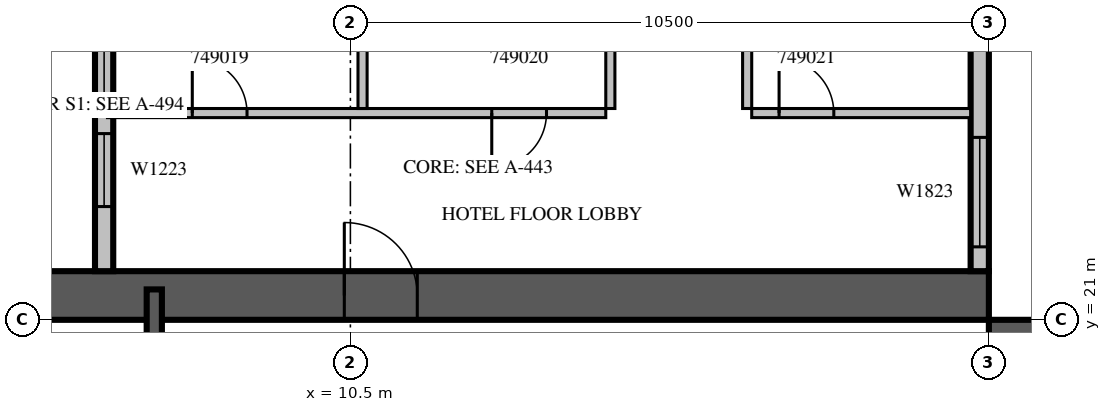
"""IFC4 building model, lengths in metres.
Left out: names, types, materials, properties, quantities, classifications, styles, units other than length and angle.
Written with IfcOpenShell. Run it as: python <this file> out.ifc"""

import sys

from ifc_helpers import new_model, si_unit, direction, frame, frame_2d, origin, place, context, subcontext, project, spatial, rectangle, extrude, source, transform, mapped, element, fill, save


model = new_model("IFC4")
c1 = context("Model", 3, precision=1e-05, world=origin(), true_north=direction((0.0, 1.0)))
c2 = subcontext(c1, "Body", "Model", "MODEL_VIEW")
j1 = project(units=[si_unit("LENGTHUNIT", "METRE"), si_unit("PLANEANGLEUNIT", "RADIAN")], contexts=[c1])
p1 = place(None, origin())
s1 = spatial("IfcSite", under=j1, at=p1, CompositionType="ELEMENT")
p2 = place(p1, origin())
s2 = spatial("IfcBuilding", under=s1, at=p2, CompositionType="ELEMENT")
p3 = place(p2, frame((0.0, 0.0, 219.6)))
s3 = spatial("IfcBuildingStorey", under=s2, at=p3, CompositionType="ELEMENT", Elevation=219.6)
m1 = source(origin(), c2, "Body", "SweptSolid", [
    extrude(rectangle(XDim=16.8, YDim=0.8, at=frame_2d((8.4, 0.0))), origin(), (0.0, 0.0, 1.0), 3.8),
])
p4 = place(p3, frame((21.4, 4.2, 0.0), z_axis=(0.0, 0.0, 1.0), x_axis=(0.0, 1.0, 0.0)))
e1 = element("IfcWall", 1, at=p4, inside=s3, PredefinedType="SHEAR", context=c2, shape_type="MappedRepresentation", body=[
    mapped(m1, transform((0.0, 0.0, 0.0), scale=1.0)),
])
m2 = source(origin(), c2, "Body", "SweptSolid", [
    extrude(rectangle(XDim=2.2, YDim=2.1, at=frame_2d((1.1, 1.05))), frame((0.0, 0.41, 0.0), z_axis=(0.0, -1.0, 0.0), x_axis=(1.0, 0.0, 0.0)), (0.0, 0.0, 1.0), 0.82),
])
p5 = place(p4, frame((4.2, 0.0, 0.0)))
e2 = element("IfcOpeningElement", 2, at=p5, cuts=e1, PredefinedType="OPENING", context=c2, shape_type="MappedRepresentation", body=[
    mapped(m2, transform((0.0, 0.0, 0.0), scale=1.0)),
])
m3 = source(origin(), c2, "Body", "SweptSolid", [
    extrude(rectangle(XDim=1.2, YDim=2.1, at=frame_2d((0.6, 1.05))), frame((0.0, 0.41, 0.0), z_axis=(0.0, -1.0, 0.0), x_axis=(1.0, 0.0, 0.0)), (0.0, 0.0, 1.0), 0.82),
])
p6 = place(p4, frame((14.7, 0.0, 0.0)))
e3 = element("IfcOpeningElement", 3, at=p6, cuts=e1, PredefinedType="OPENING", context=c2, shape_type="MappedRepresentation", body=[
    mapped(m3, transform((0.0, 0.0, 0.0), scale=1.0)),
])
p7 = place(p3, frame((4.2, 21.4, 0.0), z_axis=(0.0, 0.0, 1.0), x_axis=(1.0, 0.0, 0.0)))
e4 = element("IfcWall", 4, at=p7, inside=s3, PredefinedType="SHEAR", context=c2, shape_type="MappedRepresentation", body=[
    mapped(m1, transform((0.0, 0.0, 0.0), scale=1.0)),
])
p8 = place(p7, frame((6.2, 0.0, 0.0)))
e5 = element("IfcOpeningElement", 5, at=p8, cuts=e4, PredefinedType="OPENING", context=c2, shape_type="MappedRepresentation", body=[
    mapped(m3, transform((0.0, 0.0, 0.0), scale=1.0)),
])
m4 = source(origin(), c2, "Body", "SweptSolid", [
    extrude(rectangle(XDim=7.15, YDim=0.3, at=frame_2d((3.575, 0.0))), origin(), (0.0, 0.0, 1.0), 3.4),
])
p9 = place(p3, frame((20.85, 21.8, 0.0), z_axis=(0.0, 0.0, 1.0), x_axis=(0.0, 1.0, 0.0)))
e6 = element("IfcWall", 6, at=p9, inside=s3, PredefinedType="STANDARD", context=c2, shape_type="MappedRepresentation", body=[
    mapped(m4, transform((0.0, 0.0, 0.0), scale=1.0)),
])
m5 = source(origin(), c2, "Body", "SweptSolid", [
    extrude(rectangle(XDim=1.8, YDim=2.3, at=frame_2d((0.9, 1.15))), frame((0.0, 0.16, 0.0), z_axis=(0.0, -1.0, 0.0), x_axis=(1.0, 0.0, 0.0)), (0.0, 0.0, 1.0), 0.32),
])
p10 = place(p9, frame((0.4, 0.0, 0.6)))
e7 = element("IfcOpeningElement", 7, at=p10, cuts=e6, PredefinedType="OPENING", context=c2, shape_type="MappedRepresentation", body=[
    mapped(m5, transform((0.0, 0.0, 0.0), scale=1.0)),
])
m6 = source(origin(), c2, "Body", "SweptSolid", [
    extrude(rectangle(XDim=3.0, YDim=2.3, at=frame_2d((1.5, 1.15))), frame((0.0, 0.16, 0.0), z_axis=(0.0, -1.0, 0.0), x_axis=(1.0, 0.0, 0.0)), (0.0, 0.0, 1.0), 0.32),
])
p11 = place(p9, frame((4.0, 0.0, 0.6)))
e8 = element("IfcOpeningElement", 8, at=p11, cuts=e6, PredefinedType="OPENING", context=c2, shape_type="MappedRepresentation", body=[
    mapped(m6, transform((0.0, 0.0, 0.0), scale=1.0)),
])
m7 = source(origin(), c2, "Body", "SweptSolid", [
    extrude(rectangle(XDim=16.6, YDim=0.3, at=frame_2d((8.3, 0.0))), origin(), (0.0, 0.0, 1.0), 3.4),
])
p12 = place(p3, frame((6.45, 38.4, 0.0), z_axis=(0.0, 0.0, 1.0), x_axis=(0.0, -1.0, 0.0)))
e9 = element("IfcWall", 9, at=p12, inside=s3, PredefinedType="STANDARD", context=c2, shape_type="MappedRepresentation", body=[
    mapped(m7, transform((0.0, 0.0, 0.0), scale=1.0)),
])
p13 = place(p12, frame((1.15, 0.0, 0.6)))
e10 = element("IfcOpeningElement", 10, at=p13, cuts=e9, PredefinedType="OPENING", context=c2, shape_type="MappedRepresentation", body=[
    mapped(m5, transform((0.0, 0.0, 0.0), scale=1.0)),
])
p14 = place(p12, frame((9.438, 0.0, 0.6)))
e11 = element("IfcOpeningElement", 11, at=p14, cuts=e9, PredefinedType="OPENING", context=c2, shape_type="MappedRepresentation", body=[
    mapped(m5, transform((0.0, 0.0, 0.0), scale=1.0)),
])
m8 = source(origin(), c2, "Body", "SweptSolid", [
    extrude(rectangle(XDim=1.2, YDim=2.3, at=frame_2d((0.6, 1.15))), frame((0.0, 0.16, 0.0), z_axis=(0.0, -1.0, 0.0), x_axis=(1.0, 0.0, 0.0)), (0.0, 0.0, 1.0), 0.32),
])
p15 = place(p12, frame((14.338, 0.0, 0.6)))
e12 = element("IfcOpeningElement", 12, at=p15, cuts=e9, PredefinedType="OPENING", context=c2, shape_type="MappedRepresentation", body=[
    mapped(m8, transform((0.0, 0.0, 0.0), scale=1.0)),
])
p16 = place(p12, frame((11.887, 0.0, 0.6)))
e13 = element("IfcOpeningElement", 13, at=p16, cuts=e9, PredefinedType="OPENING", context=c2, shape_type="MappedRepresentation", body=[
    mapped(m5, transform((0.0, 0.0, 0.0), scale=1.0)),
])
m9 = source(origin(), c2, "Body", "SweptSolid", [
    extrude(rectangle(XDim=1.0, YDim=2.1, at=frame_2d((0.5, 1.05))), frame((0.0, 0.16, 0.0), z_axis=(0.0, -1.0, 0.0), x_axis=(1.0, 0.0, 0.0)), (0.0, 0.0, 1.0), 0.32),
])
p17 = place(p12, frame((5.908, 0.0, 0.0)))
e14 = element("IfcOpeningElement", 14, at=p17, cuts=e9, PredefinedType="OPENING", context=c2, shape_type="MappedRepresentation", body=[
    mapped(m9, transform((0.0, 0.0, 0.0), scale=1.0)),
])
m10 = source(origin(), c2, "Body", "SweptSolid", [
    extrude(rectangle(XDim=6.6, YDim=0.25, at=frame_2d((3.3, 0.0))), origin(), (0.0, 0.0, 1.0), 3.4),
])
p18 = place(p3, frame((7.275, 14.9, 0.0), z_axis=(0.0, 0.0, 1.0), x_axis=(0.0, 1.0, 0.0)))
e15 = element("IfcWall", 15, at=p18, inside=s3, PredefinedType="SOLIDWALL", context=c2, shape_type="MappedRepresentation", body=[
    mapped(m10, transform((0.0, 0.0, 0.0), scale=1.0)),
])
m11 = source(origin(), c2, "Body", "SweptSolid", [
    extrude(rectangle(XDim=1.1, YDim=2.1, at=frame_2d((0.55, 1.05))), frame((0.0, 0.135, 0.0), z_axis=(0.0, -1.0, 0.0), x_axis=(1.0, 0.0, 0.0)), (0.0, 0.0, 1.0), 0.27),
])
p19 = place(p18, frame((0.15, 0.0, 0.0)))
e16 = element("IfcOpeningElement", 16, at=p19, cuts=e15, PredefinedType="OPENING", context=c2, shape_type="MappedRepresentation", body=[
    mapped(m11, transform((0.0, 0.0, 0.0), scale=1.0)),
])
m12 = source(origin(), c2, "Body", "SweptSolid", [
    extrude(rectangle(XDim=8.195, YDim=0.15, at=frame_2d((4.098, 0.0))), origin(), (0.0, 0.0, 1.0), 3.4),
])
p20 = place(p3, frame((6.505, 24.4, 0.0), z_axis=(0.0, 0.0, 1.0), x_axis=(1.0, 0.0, 0.0)))
e17 = element("IfcWall", 17, at=p20, inside=s3, PredefinedType="PARTITIONING", context=c2, shape_type="MappedRepresentation", body=[
    mapped(m12, transform((0.0, 0.0, 0.0), scale=1.0)),
])
m13 = source(origin(), c2, "Body", "SweptSolid", [
    extrude(rectangle(XDim=0.9, YDim=2.1, at=frame_2d((0.45, 1.05))), frame((0.0, 0.085, 0.0), z_axis=(0.0, -1.0, 0.0), x_axis=(1.0, 0.0, 0.0)), (0.0, 0.0, 1.0), 0.17),
])
p21 = place(p20, frame((1.395, 0.0, 0.0)))
e18 = element("IfcOpeningElement", 18, at=p21, cuts=e17, PredefinedType="OPENING", context=c2, shape_type="MappedRepresentation", body=[
    mapped(m13, transform((0.0, 0.0, 0.0), scale=1.0)),
])
p22 = place(p20, frame((6.32, 0.0, 0.0)))
e19 = element("IfcOpeningElement", 19, at=p22, cuts=e17, PredefinedType="OPENING", context=c2, shape_type="MappedRepresentation", body=[
    mapped(m13, transform((0.0, 0.0, 0.0), scale=1.0)),
])
m14 = source(origin(), c2, "Body", "SweptSolid", [
    extrude(rectangle(XDim=3.6, YDim=0.15, at=frame_2d((1.8, 0.0))), origin(), (0.0, 0.0, 1.0), 3.4),
])
p23 = place(p3, frame((17.1, 24.4, 0.0), z_axis=(0.0, 0.0, 1.0), x_axis=(1.0, 0.0, 0.0)))
e20 = element("IfcWall", 20, at=p23, inside=s3, PredefinedType="PARTITIONING", context=c2, shape_type="MappedRepresentation", body=[
    mapped(m14, transform((0.0, 0.0, 0.0), scale=1.0)),
])
p24 = place(p23, frame((0.45, 0.0, 0.0)))
e21 = element("IfcOpeningElement", 21, at=p24, cuts=e20, PredefinedType="OPENING", context=c2, shape_type="MappedRepresentation", body=[
    mapped(m13, transform((0.0, 0.0, 0.0), scale=1.0)),
])
m15 = source(origin(), c2, "Body", "SweptSolid", [
    extrude(rectangle(XDim=4.476, YDim=0.15, at=frame_2d((2.238, 0.0))), origin(), (0.0, 0.0, 1.0), 3.4),
])
p25 = place(p3, frame((10.7, 24.475, 0.0), z_axis=(0.0, 0.0, 1.0), x_axis=(0.0, 1.0, 0.0)))
e22 = element("IfcWall", 22, at=p25, inside=s3, PredefinedType="PARTITIONING", context=c2, shape_type="MappedRepresentation", body=[
    mapped(m15, transform((0.0, 0.0, 0.0), scale=1.0)),
])
m16 = source(origin(), c2, "Body", "SweptSolid", [
    extrude(rectangle(XDim=4.85, YDim=0.15, at=frame_2d((2.425, 0.0))), origin(), (0.0, 0.0, 1.0), 3.4),
])
for number, where, z_axis, x_axis in (
    (23, (14.775, 24.475, 0.0), (0.0, 0.0, 1.0), (0.0, 1.0, 0.0)),
    (24, (17.025, 29.325, 0.0), (0.0, 0.0, 1.0), (0.0, -1.0, 0.0)),
):
    element("IfcWall", number, at=place(p3, frame(where, z_axis=z_axis, x_axis=x_axis)), inside=s3, PredefinedType="PARTITIONING", context=c2, shape_type="MappedRepresentation", body=[
        mapped(m16, transform((0.0, 0.0, 0.0), scale=1.0)),
    ])
m17 = source(origin(), c2, "Body", "SweptSolid", [
    extrude(rectangle(XDim=1.8, YDim=2.3, at=frame_2d((0.9, 1.15))), frame((0.0, 0.03, 0.0), z_axis=(0.0, -1.0, 0.0), x_axis=(1.0, 0.0, 0.0)), (0.0, 0.0, 1.0), 0.06),
])
p26 = place(p10, origin())
e25 = element("IfcWindow", 25, at=p26, inside=s3, PartitioningType="SINGLE_PANEL", PredefinedType="WINDOW", context=c2, shape_type="MappedRepresentation", body=[
    mapped(m17, transform((0.0, 0.0, 0.0), scale=1.0)),
])
fill(e7, e25)
m18 = source(origin(), c2, "Body", "SweptSolid", [
    extrude(rectangle(XDim=1.2, YDim=2.3, at=frame_2d((0.6, 1.15))), frame((0.0, 0.03, 0.0), z_axis=(0.0, -1.0, 0.0), x_axis=(1.0, 0.0, 0.0)), (0.0, 0.0, 1.0), 0.06),
])
p27 = place(p15, origin())
e26 = element("IfcWindow", 26, at=p27, inside=s3, PartitioningType="SINGLE_PANEL", PredefinedType="WINDOW", context=c2, shape_type="MappedRepresentation", body=[
    mapped(m18, transform((0.0, 0.0, 0.0), scale=1.0)),
])
fill(e12, e26)
p28 = place(p16, origin())
e27 = element("IfcWindow", 27, at=p28, inside=s3, PartitioningType="SINGLE_PANEL", PredefinedType="WINDOW", context=c2, shape_type="MappedRepresentation", body=[
    mapped(m17, transform((0.0, 0.0, 0.0), scale=1.0)),
])
fill(e13, e27)
m19 = source(origin(), c2, "Body", "SweptSolid", [
    extrude(rectangle(XDim=1.2, YDim=2.1, at=frame_2d((0.6, 1.05))), frame((0.0, 0.025, 0.0), z_axis=(0.0, -1.0, 0.0), x_axis=(1.0, 0.0, 0.0)), (0.0, 0.0, 1.0), 0.05),
])
p29 = place(p8, origin())
e28 = element("IfcDoor", 28, at=p29, inside=s3, OperationType="SINGLE_SWING_LEFT", PredefinedType="DOOR", context=c2, shape_type="MappedRepresentation", body=[
    mapped(m19, transform((0.0, 0.0, 0.0), scale=1.0)),
])
fill(e5, e28)
m20 = source(origin(), c2, "Body", "SweptSolid", [
    extrude(rectangle(XDim=0.9, YDim=2.1, at=frame_2d((0.45, 1.05))), frame((0.0, 0.025, 0.0), z_axis=(0.0, -1.0, 0.0), x_axis=(1.0, 0.0, 0.0)), (0.0, 0.0, 1.0), 0.05),
])
p30 = place(p21, origin())
e29 = element("IfcDoor", 29, at=p30, inside=s3, OperationType="SINGLE_SWING_LEFT", PredefinedType="DOOR", context=c2, shape_type="MappedRepresentation", body=[
    mapped(m20, transform((0.0, 0.0, 0.0), scale=1.0)),
])
fill(e18, e29)
p31 = place(p22, origin())
e30 = element("IfcDoor", 30, at=p31, inside=s3, OperationType="SINGLE_SWING_RIGHT", PredefinedType="DOOR", context=c2, shape_type="MappedRepresentation", body=[
    mapped(m20, transform((0.0, 0.0, 0.0), scale=1.0)),
])
fill(e19, e30)
p32 = place(p24, origin())
e31 = element("IfcDoor", 31, at=p32, inside=s3, OperationType="SINGLE_SWING_LEFT", PredefinedType="DOOR", context=c2, shape_type="MappedRepresentation", body=[
    mapped(m20, transform((0.0, 0.0, 0.0), scale=1.0)),
])
fill(e21, e31)
save(model, sys.argv[1])
